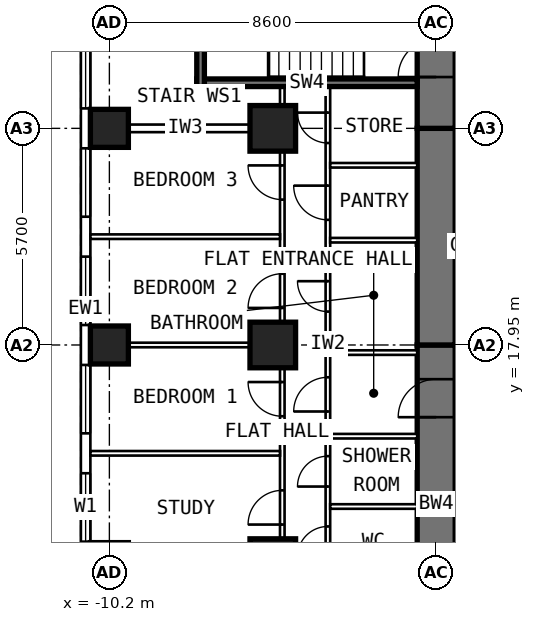
"""IFC4 building model, lengths in metres.
Left out: names, types, materials, properties, quantities, classifications, styles, units other than length and angle.
Written with IfcOpenShell. Run it as: python <this file> out.ifc"""

import sys

from ifc_helpers import new_model, si_unit, direction, frame, frame_2d, origin, origin_2d, place, context, subcontext, project, spatial, rectangle, extrude, element, fill, save


model = new_model("IFC4")
c1 = context("Model", 3, precision=1e-05, world=origin(), true_north=direction((0.0, 1.0)))
c2 = subcontext(c1, "Body", "Model", "MODEL_VIEW")
j1 = project(units=[si_unit("LENGTHUNIT", "METRE"), si_unit("PLANEANGLEUNIT", "RADIAN")], contexts=[c1])
p1 = place(None, origin())
s1 = spatial("IfcSite", under=j1, at=p1, CompositionType="ELEMENT")
p2 = place(p1, origin())
s2 = spatial("IfcBuilding", under=s1, at=p2, CompositionType="ELEMENT")
p3 = place(p2, frame((0.0, 0.0, 71.8)))
s3 = spatial("IfcBuildingStorey", under=s2, at=p3, CompositionType="ELEMENT", Elevation=71.8)
for number, where, z_axis, x_axis in (
    (1, (-10.2, 17.95, 0.0), (0.0, 0.0, 1.0), (0.0, 1.0, 0.0)),
    (2, (-10.2, 23.65, 0.0), (0.0, 0.0, 1.0), (0.0, 1.0, 0.0)),
):
    element("IfcColumn", number, at=place(p3, frame(where, z_axis=z_axis, x_axis=x_axis)), inside=s3, PredefinedType="COLUMN", context=c2, shape_type="SweptSolid", body=[
        extrude(rectangle(XDim=1.0, YDim=1.0, at=origin_2d()), origin(), (0.0, 0.0, 1.0), 3.6),
    ])
for number, where, z_axis, x_axis in (
    (3, (-5.9, 12.25, 0.0), (0.0, 0.0, 1.0), (0.0, 1.0, 0.0)),
    (4, (-5.9, 17.95, 0.0), (0.0, 0.0, 1.0), (0.0, 1.0, 0.0)),
    (5, (-5.9, 23.65, 0.0), (0.0, 0.0, 1.0), (0.0, 1.0, 0.0)),
):
    element("IfcColumn", number, at=place(p3, frame(where, z_axis=z_axis, x_axis=x_axis)), inside=s3, PredefinedType="COLUMN", context=c2, shape_type="SweptSolid", body=[
        extrude(rectangle(XDim=1.2, YDim=1.2, at=origin_2d()), origin(), (0.0, 0.0, 1.0), 3.6),
    ])
p4 = place(p3, frame((-1.6, 9.6, 0.0), z_axis=(0.0, 0.0, 1.0), x_axis=(0.0, 1.0, 0.0)))
e6 = element("IfcWall", 6, at=p4, inside=s3, PredefinedType="SHEAR", context=c2, shape_type="SweptSolid", body=[
    extrude(rectangle(XDim=8.35, YDim=1.0, at=frame_2d((4.175, 0.0))), origin(), (0.0, 0.0, 1.0), 3.6),
])
p5 = place(p4, frame((6.45, 0.0, 0.0)))
e7 = element("IfcOpeningElement", 7, at=p5, cuts=e6, PredefinedType="OPENING", context=c2, shape_type="SweptSolid", body=[
    extrude(rectangle(XDim=1.0, YDim=2.1, at=frame_2d((0.5, 1.05))), frame((0.0, 0.512, 0.0), z_axis=(0.0, -1.0, 0.0), x_axis=(1.0, 0.0, 0.0)), (0.0, 0.0, 1.0), 1.024),
])
p6 = place(p3, frame((-1.6, 17.95, 0.0), z_axis=(0.0, 0.0, 1.0), x_axis=(0.0, 1.0, 0.0)))
e8 = element("IfcWall", 8, at=p6, inside=s3, PredefinedType="SHEAR", context=c2, shape_type="SweptSolid", body=[
    extrude(rectangle(XDim=5.7, YDim=1.0, at=frame_2d((2.85, 0.0))), origin(), (0.0, 0.0, 1.0), 3.6),
])
p7 = place(p3, frame((-1.6, 23.65, 0.0), z_axis=(0.0, 0.0, 1.0), x_axis=(0.0, 1.0, 0.0)))
e9 = element("IfcWall", 9, at=p7, inside=s3, PredefinedType="SHEAR", context=c2, shape_type="SweptSolid", body=[
    extrude(rectangle(XDim=10.745, YDim=1.0, at=frame_2d((5.373, 0.0))), origin(), (0.0, 0.0, 1.0), 3.6),
])
p8 = place(p7, frame((6.1, 0.0, 0.0)))
e10 = element("IfcOpeningElement", 10, at=p8, cuts=e9, PredefinedType="OPENING", context=c2, shape_type="SweptSolid", body=[
    extrude(rectangle(XDim=1.0, YDim=2.1, at=frame_2d((0.5, 1.05))), frame((0.0, 0.512, 0.0), z_axis=(0.0, -1.0, 0.0), x_axis=(1.0, 0.0, 0.0)), (0.0, 0.0, 1.0), 1.024),
])
p9 = place(p7, frame((1.35, 0.0, 0.0)))
e11 = element("IfcOpeningElement", 11, at=p9, cuts=e9, PredefinedType="OPENING", context=c2, shape_type="SweptSolid", body=[
    extrude(rectangle(XDim=1.0, YDim=2.1, at=frame_2d((0.5, 1.05))), frame((0.0, 0.512, 0.0), z_axis=(0.0, -1.0, 0.0), x_axis=(1.0, 0.0, 0.0)), (0.0, 0.0, 1.0), 1.024),
])
p10 = place(p3, frame((-10.825, 6.148, 0.0), z_axis=(0.0, 0.0, 1.0), x_axis=(0.0, 1.0, 0.0)))
e12 = element("IfcWall", 12, at=p10, inside=s3, PredefinedType="SOLIDWALL", context=c2, shape_type="SweptSolid", body=[
    extrude(rectangle(XDim=25.487, YDim=0.25, at=frame_2d((12.744, 0.0))), origin(), (0.0, 0.0, 1.0), 3.35),
])
p11 = place(p10, frame((0.927, 0.0, 0.8)))
e13 = element("IfcOpeningElement", 13, at=p11, cuts=e12, PredefinedType="OPENING", context=c2, shape_type="SweptSolid", body=[
    extrude(rectangle(XDim=1.8, YDim=1.8, at=frame_2d((0.9, 0.9))), frame((0.0, 0.137, 0.0), z_axis=(0.0, -1.0, 0.0), x_axis=(1.0, 0.0, 0.0)), (0.0, 0.0, 1.0), 0.274),
])
p12 = place(p10, frame((3.777, 0.0, 0.8)))
e14 = element("IfcOpeningElement", 14, at=p12, cuts=e12, PredefinedType="OPENING", context=c2, shape_type="SweptSolid", body=[
    extrude(rectangle(XDim=1.8, YDim=1.8, at=frame_2d((0.9, 0.9))), frame((0.0, 0.137, 0.0), z_axis=(0.0, -1.0, 0.0), x_axis=(1.0, 0.0, 0.0)), (0.0, 0.0, 1.0), 0.274),
])
p13 = place(p10, frame((6.627, 0.0, 0.8)))
e15 = element("IfcOpeningElement", 15, at=p13, cuts=e12, PredefinedType="OPENING", context=c2, shape_type="SweptSolid", body=[
    extrude(rectangle(XDim=1.8, YDim=1.8, at=frame_2d((0.9, 0.9))), frame((0.0, 0.137, 0.0), z_axis=(0.0, -1.0, 0.0), x_axis=(1.0, 0.0, 0.0)), (0.0, 0.0, 1.0), 0.274),
])
p14 = place(p10, frame((9.477, 0.0, 0.8)))
e16 = element("IfcOpeningElement", 16, at=p14, cuts=e12, PredefinedType="OPENING", context=c2, shape_type="SweptSolid", body=[
    extrude(rectangle(XDim=1.8, YDim=1.8, at=frame_2d((0.9, 0.9))), frame((0.0, 0.137, 0.0), z_axis=(0.0, -1.0, 0.0), x_axis=(1.0, 0.0, 0.0)), (0.0, 0.0, 1.0), 0.274),
])
p15 = place(p10, frame((12.327, 0.0, 0.8)))
e17 = element("IfcOpeningElement", 17, at=p15, cuts=e12, PredefinedType="OPENING", context=c2, shape_type="SweptSolid", body=[
    extrude(rectangle(XDim=1.8, YDim=1.8, at=frame_2d((0.9, 0.9))), frame((0.0, 0.137, 0.0), z_axis=(0.0, -1.0, 0.0), x_axis=(1.0, 0.0, 0.0)), (0.0, 0.0, 1.0), 0.274),
])
p16 = place(p10, frame((15.177, 0.0, 0.8)))
e18 = element("IfcOpeningElement", 18, at=p16, cuts=e12, PredefinedType="OPENING", context=c2, shape_type="SweptSolid", body=[
    extrude(rectangle(XDim=1.8, YDim=1.8, at=frame_2d((0.9, 0.9))), frame((0.0, 0.137, 0.0), z_axis=(0.0, -1.0, 0.0), x_axis=(1.0, 0.0, 0.0)), (0.0, 0.0, 1.0), 0.274),
])
p17 = place(p10, frame((18.027, 0.0, 0.8)))
e19 = element("IfcOpeningElement", 19, at=p17, cuts=e12, PredefinedType="OPENING", context=c2, shape_type="SweptSolid", body=[
    extrude(rectangle(XDim=1.8, YDim=1.8, at=frame_2d((0.9, 0.9))), frame((0.0, 0.137, 0.0), z_axis=(0.0, -1.0, 0.0), x_axis=(1.0, 0.0, 0.0)), (0.0, 0.0, 1.0), 0.274),
])
p18 = place(p10, frame((20.877, 0.0, 0.8)))
e20 = element("IfcOpeningElement", 20, at=p18, cuts=e12, PredefinedType="OPENING", context=c2, shape_type="SweptSolid", body=[
    extrude(rectangle(XDim=1.8, YDim=1.8, at=frame_2d((0.9, 0.9))), frame((0.0, 0.137, 0.0), z_axis=(0.0, -1.0, 0.0), x_axis=(1.0, 0.0, 0.0)), (0.0, 0.0, 1.0), 0.274),
])
p19 = place(p3, frame((-4.45, 10.1, 0.0), z_axis=(0.0, 0.0, 1.0), x_axis=(0.0, 1.0, 0.0)))
e21 = element("IfcWall", 21, at=p19, inside=s3, PredefinedType="PARTITIONING", context=c2, shape_type="SweptSolid", body=[
    extrude(rectangle(XDim=14.65, YDim=0.12, at=frame_2d((7.325, 0.0))), origin(), (0.0, 0.0, 1.0), 3.35),
])
p20 = place(p19, frame((0.375, 0.0, 0.0)))
e22 = element("IfcOpeningElement", 22, at=p20, cuts=e21, PredefinedType="OPENING", context=c2, shape_type="SweptSolid", body=[
    extrude(rectangle(XDim=0.9, YDim=2.1, at=frame_2d((0.45, 1.05))), frame((0.0, 0.072, 0.0), z_axis=(0.0, -1.0, 0.0), x_axis=(1.0, 0.0, 0.0)), (0.0, 0.0, 1.0), 0.144),
])
p21 = place(p19, frame((2.275, 0.0, 0.0)))
e23 = element("IfcOpeningElement", 23, at=p21, cuts=e21, PredefinedType="OPENING", context=c2, shape_type="SweptSolid", body=[
    extrude(rectangle(XDim=0.8, YDim=2.1, at=frame_2d((0.4, 1.05))), frame((0.0, 0.072, 0.0), z_axis=(0.0, -1.0, 0.0), x_axis=(1.0, 0.0, 0.0)), (0.0, 0.0, 1.0), 0.144),
])
p22 = place(p19, frame((4.125, 0.0, 0.0)))
e24 = element("IfcOpeningElement", 24, at=p22, cuts=e21, PredefinedType="OPENING", context=c2, shape_type="SweptSolid", body=[
    extrude(rectangle(XDim=0.8, YDim=2.1, at=frame_2d((0.4, 1.05))), frame((0.0, 0.072, 0.0), z_axis=(0.0, -1.0, 0.0), x_axis=(1.0, 0.0, 0.0)), (0.0, 0.0, 1.0), 0.144),
])
p23 = place(p19, frame((6.1, 0.0, 0.0)))
e25 = element("IfcOpeningElement", 25, at=p23, cuts=e21, PredefinedType="OPENING", context=c2, shape_type="SweptSolid", body=[
    extrude(rectangle(XDim=0.9, YDim=2.1, at=frame_2d((0.45, 1.05))), frame((0.0, 0.072, 0.0), z_axis=(0.0, -1.0, 0.0), x_axis=(1.0, 0.0, 0.0)), (0.0, 0.0, 1.0), 0.144),
])
p24 = place(p19, frame((8.729, 0.0, 0.0)))
e26 = element("IfcOpeningElement", 26, at=p24, cuts=e21, PredefinedType="OPENING", context=c2, shape_type="SweptSolid", body=[
    extrude(rectangle(XDim=0.8, YDim=2.1, at=frame_2d((0.4, 1.05))), frame((0.0, 0.072, 0.0), z_axis=(0.0, -1.0, 0.0), x_axis=(1.0, 0.0, 0.0)), (0.0, 0.0, 1.0), 0.144),
])
p25 = place(p19, frame((11.143, 0.0, 0.0)))
e27 = element("IfcOpeningElement", 27, at=p25, cuts=e21, PredefinedType="OPENING", context=c2, shape_type="SweptSolid", body=[
    extrude(rectangle(XDim=0.9, YDim=2.1, at=frame_2d((0.45, 1.05))), frame((0.0, 0.072, 0.0), z_axis=(0.0, -1.0, 0.0), x_axis=(1.0, 0.0, 0.0)), (0.0, 0.0, 1.0), 0.144),
])
p26 = place(p19, frame((13.164, 0.0, 0.0)))
e28 = element("IfcOpeningElement", 28, at=p26, cuts=e21, PredefinedType="OPENING", context=c2, shape_type="SweptSolid", body=[
    extrude(rectangle(XDim=0.8, YDim=2.1, at=frame_2d((0.4, 1.05))), frame((0.0, 0.072, 0.0), z_axis=(0.0, -1.0, 0.0), x_axis=(1.0, 0.0, 0.0)), (0.0, 0.0, 1.0), 0.144),
])
p27 = place(p3, frame((-5.65, 9.6, 0.0), z_axis=(0.0, 0.0, 1.0), x_axis=(0.0, 1.0, 0.0)))
e29 = element("IfcWall", 29, at=p27, inside=s3, PredefinedType="PARTITIONING", context=c2, shape_type="SweptSolid", body=[
    extrude(rectangle(XDim=15.15, YDim=0.12, at=frame_2d((7.575, 0.0))), origin(), (0.0, 0.0, 1.0), 3.35),
])
p28 = place(p27, frame((1.0, 0.0, 0.0)))
e30 = element("IfcOpeningElement", 30, at=p28, cuts=e29, PredefinedType="OPENING", context=c2, shape_type="SweptSolid", body=[
    extrude(rectangle(XDim=0.9, YDim=2.1, at=frame_2d((0.45, 1.05))), frame((0.0, 0.072, 0.0), z_axis=(0.0, -1.0, 0.0), x_axis=(1.0, 0.0, 0.0)), (0.0, 0.0, 1.0), 0.144),
])
p29 = place(p27, frame((3.625, 0.0, 0.0)))
e31 = element("IfcOpeningElement", 31, at=p29, cuts=e29, PredefinedType="OPENING", context=c2, shape_type="SweptSolid", body=[
    extrude(rectangle(XDim=0.9, YDim=2.1, at=frame_2d((0.45, 1.05))), frame((0.0, 0.072, 0.0), z_axis=(0.0, -1.0, 0.0), x_axis=(1.0, 0.0, 0.0)), (0.0, 0.0, 1.0), 0.144),
])
p30 = place(p27, frame((6.475, 0.0, 0.0)))
e32 = element("IfcOpeningElement", 32, at=p30, cuts=e29, PredefinedType="OPENING", context=c2, shape_type="SweptSolid", body=[
    extrude(rectangle(XDim=0.9, YDim=2.1, at=frame_2d((0.45, 1.05))), frame((0.0, 0.072, 0.0), z_axis=(0.0, -1.0, 0.0), x_axis=(1.0, 0.0, 0.0)), (0.0, 0.0, 1.0), 0.144),
])
p31 = place(p27, frame((9.325, 0.0, 0.0)))
e33 = element("IfcOpeningElement", 33, at=p31, cuts=e29, PredefinedType="OPENING", context=c2, shape_type="SweptSolid", body=[
    extrude(rectangle(XDim=0.9, YDim=2.1, at=frame_2d((0.45, 1.05))), frame((0.0, 0.072, 0.0), z_axis=(0.0, -1.0, 0.0), x_axis=(1.0, 0.0, 0.0)), (0.0, 0.0, 1.0), 0.144),
])
p32 = place(p27, frame((12.175, 0.0, 0.0)))
e34 = element("IfcOpeningElement", 34, at=p32, cuts=e29, PredefinedType="OPENING", context=c2, shape_type="SweptSolid", body=[
    extrude(rectangle(XDim=0.9, YDim=2.1, at=frame_2d((0.45, 1.05))), frame((0.0, 0.072, 0.0), z_axis=(0.0, -1.0, 0.0), x_axis=(1.0, 0.0, 0.0)), (0.0, 0.0, 1.0), 0.144),
])
p33 = place(p3, frame((-5.71, 15.1, 0.0), z_axis=(0.0, 0.0, 1.0), x_axis=(-1.0, 0.0, 0.0)))
e35 = element("IfcWall", 35, at=p33, inside=s3, PredefinedType="PARTITIONING", context=c2, shape_type="SweptSolid", body=[
    extrude(rectangle(XDim=4.99, YDim=0.12, at=frame_2d((2.495, 0.0))), origin(), (0.0, 0.0, 1.0), 3.35),
])
p34 = place(p3, frame((-5.71, 17.95, 0.0), z_axis=(0.0, 0.0, 1.0), x_axis=(-1.0, 0.0, 0.0)))
e36 = element("IfcWall", 36, at=p34, inside=s3, PredefinedType="PARTITIONING", context=c2, shape_type="SweptSolid", body=[
    extrude(rectangle(XDim=4.99, YDim=0.12, at=frame_2d((2.495, 0.0))), origin(), (0.0, 0.0, 1.0), 2.45),
])
p35 = place(p3, frame((-5.71, 20.8, 0.0), z_axis=(0.0, 0.0, 1.0), x_axis=(-1.0, 0.0, 0.0)))
e37 = element("IfcWall", 37, at=p35, inside=s3, PredefinedType="PARTITIONING", context=c2, shape_type="SweptSolid", body=[
    extrude(rectangle(XDim=4.99, YDim=0.12, at=frame_2d((2.495, 0.0))), origin(), (0.0, 0.0, 1.0), 3.35),
])
for number, where, z_axis, x_axis in (
    (38, (-2.1, 13.7, 0.0), (0.0, 0.0, 1.0), (-1.0, 0.0, 0.0)),
    (39, (-2.1, 15.55, 0.0), (0.0, 0.0, 1.0), (-1.0, 0.0, 0.0)),
):
    element("IfcWall", number, at=place(p3, frame(where, z_axis=z_axis, x_axis=x_axis)), inside=s3, PredefinedType="PARTITIONING", context=c2, shape_type="SweptSolid", body=[
        extrude(rectangle(XDim=2.29, YDim=0.12, at=frame_2d((1.145, 0.0))), origin(), (0.0, 0.0, 1.0), 3.35),
    ])
p36 = place(p3, frame((-2.1, 17.75, 0.0), z_axis=(0.0, 0.0, 1.0), x_axis=(-1.0, 0.0, 0.0)))
e40 = element("IfcWall", 40, at=p36, inside=s3, PredefinedType="PARTITIONING", context=c2, shape_type="SweptSolid", body=[
    extrude(rectangle(XDim=2.29, YDim=0.12, at=frame_2d((1.145, 0.0))), origin(), (0.0, 0.0, 1.0), 2.45),
])
for number, where, z_axis, x_axis in (
    (41, (-2.1, 20.707, 0.0), (0.0, 0.0, 1.0), (-1.0, 0.0, 0.0)),
    (42, (-2.1, 22.678, 0.0), (0.0, 0.0, 1.0), (-1.0, 0.0, 0.0)),
):
    element("IfcWall", number, at=place(p3, frame(where, z_axis=z_axis, x_axis=x_axis)), inside=s3, PredefinedType="PARTITIONING", context=c2, shape_type="SweptSolid", body=[
        extrude(rectangle(XDim=2.29, YDim=0.12, at=frame_2d((1.145, 0.0))), origin(), (0.0, 0.0, 1.0), 3.35),
    ])
p37 = place(p3, frame((-5.71, 23.65, 0.0), z_axis=(0.0, 0.0, 1.0), x_axis=(-1.0, 0.0, 0.0)))
e43 = element("IfcWall", 43, at=p37, inside=s3, PredefinedType="PARTITIONING", context=c2, shape_type="SweptSolid", body=[
    extrude(rectangle(XDim=4.99, YDim=0.2, at=frame_2d((2.495, 0.0))), origin(), (0.0, 0.0, 1.0), 2.45),
])
p38 = place(p3, frame((-2.1, 24.85, 0.0), z_axis=(0.0, 0.0, 1.0), x_axis=(-1.0, 0.0, 0.0)))
e44 = element("IfcWall", 44, at=p38, inside=s3, PredefinedType="SHEAR", context=c2, shape_type="SweptSolid", body=[
    extrude(rectangle(XDim=5.8, YDim=0.2, at=frame_2d((2.9, 0.0))), origin(), (0.0, 0.0, 1.0), 3.33),
])
p39 = place(p3, frame((-7.8, 24.75, 0.0), z_axis=(0.0, 0.0, 1.0), x_axis=(0.0, 1.0, 0.0)))
e45 = element("IfcWall", 45, at=p39, inside=s3, PredefinedType="SHEAR", context=c2, shape_type="SweptSolid", body=[
    extrude(rectangle(XDim=4.0, YDim=0.2, at=frame_2d((2.0, 0.0))), origin(), (0.0, 0.0, 1.0), 3.33),
])
p40 = place(p13, origin())
e46 = element("IfcWindow", 46, at=p40, inside=s3, PartitioningType="SINGLE_PANEL", PredefinedType="WINDOW", context=c2, shape_type="SweptSolid", body=[
    extrude(rectangle(XDim=1.8, YDim=1.8, at=frame_2d((0.9, 0.9))), frame((0.0, 0.03, 0.0), z_axis=(0.0, -1.0, 0.0), x_axis=(1.0, 0.0, 0.0)), (0.0, 0.0, 1.0), 0.06),
])
fill(e15, e46)
p41 = place(p14, origin())
e47 = element("IfcWindow", 47, at=p41, inside=s3, PartitioningType="SINGLE_PANEL", PredefinedType="WINDOW", context=c2, shape_type="SweptSolid", body=[
    extrude(rectangle(XDim=1.8, YDim=1.8, at=frame_2d((0.9, 0.9))), frame((0.0, 0.03, 0.0), z_axis=(0.0, -1.0, 0.0), x_axis=(1.0, 0.0, 0.0)), (0.0, 0.0, 1.0), 0.06),
])
fill(e16, e47)
p42 = place(p15, origin())
e48 = element("IfcWindow", 48, at=p42, inside=s3, PartitioningType="SINGLE_PANEL", PredefinedType="WINDOW", context=c2, shape_type="SweptSolid", body=[
    extrude(rectangle(XDim=1.8, YDim=1.8, at=frame_2d((0.9, 0.9))), frame((0.0, 0.03, 0.0), z_axis=(0.0, -1.0, 0.0), x_axis=(1.0, 0.0, 0.0)), (0.0, 0.0, 1.0), 0.06),
])
fill(e17, e48)
p43 = place(p16, origin())
e49 = element("IfcWindow", 49, at=p43, inside=s3, PartitioningType="SINGLE_PANEL", PredefinedType="WINDOW", context=c2, shape_type="SweptSolid", body=[
    extrude(rectangle(XDim=1.8, YDim=1.8, at=frame_2d((0.9, 0.9))), frame((0.0, 0.03, 0.0), z_axis=(0.0, -1.0, 0.0), x_axis=(1.0, 0.0, 0.0)), (0.0, 0.0, 1.0), 0.06),
])
fill(e18, e49)
p44 = place(p17, origin())
e50 = element("IfcWindow", 50, at=p44, inside=s3, PartitioningType="SINGLE_PANEL", PredefinedType="WINDOW", context=c2, shape_type="SweptSolid", body=[
    extrude(rectangle(XDim=1.8, YDim=1.8, at=frame_2d((0.9, 0.9))), frame((0.0, 0.03, 0.0), z_axis=(0.0, -1.0, 0.0), x_axis=(1.0, 0.0, 0.0)), (0.0, 0.0, 1.0), 0.06),
])
fill(e19, e50)
p45 = place(p5, origin())
e51 = element("IfcDoor", 51, at=p45, inside=s3, OperationType="SINGLE_SWING_LEFT", PredefinedType="DOOR", context=c2, shape_type="SweptSolid", body=[
    extrude(rectangle(XDim=1.0, YDim=2.1, at=frame_2d((0.5, 1.05))), frame((0.0, 0.25, 0.0), z_axis=(0.0, -1.0, 0.0), x_axis=(1.0, 0.0, 0.0)), (0.0, 0.0, 1.0), 0.5),
])
fill(e7, e51)
p46 = place(p29, origin())
e52 = element("IfcDoor", 52, at=p46, inside=s3, OperationType="SINGLE_SWING_LEFT", PredefinedType="DOOR", context=c2, shape_type="SweptSolid", body=[
    extrude(rectangle(XDim=0.9, YDim=2.1, at=frame_2d((0.45, 1.05))), frame((0.0, 0.025, 0.0), z_axis=(0.0, -1.0, 0.0), x_axis=(1.0, 0.0, 0.0)), (0.0, 0.0, 1.0), 0.05),
])
fill(e31, e52)
p47 = place(p30, origin())
e53 = element("IfcDoor", 53, at=p47, inside=s3, OperationType="SINGLE_SWING_RIGHT", PredefinedType="DOOR", context=c2, shape_type="SweptSolid", body=[
    extrude(rectangle(XDim=0.9, YDim=2.1, at=frame_2d((0.45, 1.05))), frame((0.0, 0.025, 0.0), z_axis=(0.0, -1.0, 0.0), x_axis=(1.0, 0.0, 0.0)), (0.0, 0.0, 1.0), 0.05),
])
fill(e32, e53)
p48 = place(p31, origin())
e54 = element("IfcDoor", 54, at=p48, inside=s3, OperationType="SINGLE_SWING_LEFT", PredefinedType="DOOR", context=c2, shape_type="SweptSolid", body=[
    extrude(rectangle(XDim=0.9, YDim=2.1, at=frame_2d((0.45, 1.05))), frame((0.0, 0.025, 0.0), z_axis=(0.0, -1.0, 0.0), x_axis=(1.0, 0.0, 0.0)), (0.0, 0.0, 1.0), 0.05),
])
fill(e33, e54)
p49 = place(p32, origin())
e55 = element("IfcDoor", 55, at=p49, inside=s3, OperationType="SINGLE_SWING_RIGHT", PredefinedType="DOOR", context=c2, shape_type="SweptSolid", body=[
    extrude(rectangle(XDim=0.9, YDim=2.1, at=frame_2d((0.45, 1.05))), frame((0.0, 0.025, 0.0), z_axis=(0.0, -1.0, 0.0), x_axis=(1.0, 0.0, 0.0)), (0.0, 0.0, 1.0), 0.05),
])
fill(e34, e55)
p50 = place(p21, origin())
e56 = element("IfcDoor", 56, at=p50, inside=s3, OperationType="SINGLE_SWING_LEFT", PredefinedType="DOOR", context=c2, shape_type="SweptSolid", body=[
    extrude(rectangle(XDim=0.8, YDim=2.1, at=frame_2d((0.4, 1.05))), frame((0.0, 0.025, 0.0), z_axis=(0.0, -1.0, 0.0), x_axis=(1.0, 0.0, 0.0)), (0.0, 0.0, 1.0), 0.05),
])
fill(e23, e56)
p51 = place(p22, origin())
e57 = element("IfcDoor", 57, at=p51, inside=s3, OperationType="SINGLE_SWING_LEFT", PredefinedType="DOOR", context=c2, shape_type="SweptSolid", body=[
    extrude(rectangle(XDim=0.8, YDim=2.1, at=frame_2d((0.4, 1.05))), frame((0.0, 0.025, 0.0), z_axis=(0.0, -1.0, 0.0), x_axis=(1.0, 0.0, 0.0)), (0.0, 0.0, 1.0), 0.05),
])
fill(e24, e57)
p52 = place(p23, origin())
e58 = element("IfcDoor", 58, at=p52, inside=s3, OperationType="SINGLE_SWING_LEFT", PredefinedType="DOOR", context=c2, shape_type="SweptSolid", body=[
    extrude(rectangle(XDim=0.9, YDim=2.1, at=frame_2d((0.45, 1.05))), frame((0.0, 0.025, 0.0), z_axis=(0.0, -1.0, 0.0), x_axis=(1.0, 0.0, 0.0)), (0.0, 0.0, 1.0), 0.05),
])
fill(e25, e58)
p53 = place(p24, origin())
e59 = element("IfcDoor", 59, at=p53, inside=s3, OperationType="SINGLE_SWING_RIGHT", PredefinedType="DOOR", context=c2, shape_type="SweptSolid", body=[
    extrude(rectangle(XDim=0.8, YDim=2.1, at=frame_2d((0.4, 1.05))), frame((0.0, 0.025, 0.0), z_axis=(0.0, -1.0, 0.0), x_axis=(1.0, 0.0, 0.0)), (0.0, 0.0, 1.0), 0.05),
])
fill(e26, e59)
p54 = place(p25, origin())
e60 = element("IfcDoor", 60, at=p54, inside=s3, OperationType="SINGLE_SWING_RIGHT", PredefinedType="DOOR", context=c2, shape_type="SweptSolid", body=[
    extrude(rectangle(XDim=0.9, YDim=2.1, at=frame_2d((0.45, 1.05))), frame((0.0, 0.025, 0.0), z_axis=(0.0, -1.0, 0.0), x_axis=(1.0, 0.0, 0.0)), (0.0, 0.0, 1.0), 0.05),
])
fill(e27, e60)
p55 = place(p26, origin())
e61 = element("IfcDoor", 61, at=p55, inside=s3, OperationType="SINGLE_SWING_RIGHT", PredefinedType="DOOR", context=c2, shape_type="SweptSolid", body=[
    extrude(rectangle(XDim=0.8, YDim=2.1, at=frame_2d((0.4, 1.05))), frame((0.0, 0.025, 0.0), z_axis=(0.0, -1.0, 0.0), x_axis=(1.0, 0.0, 0.0)), (0.0, 0.0, 1.0), 0.05),
])
fill(e28, e61)
p56 = place(p9, origin())
e62 = element("IfcDoor", 62, at=p56, inside=s3, OperationType="SINGLE_SWING_LEFT", PredefinedType="DOOR", context=c2, shape_type="SweptSolid", body=[
    extrude(rectangle(XDim=1.0, YDim=2.1, at=frame_2d((0.5, 1.05))), frame((0.0, 0.25, 0.0), z_axis=(0.0, -1.0, 0.0), x_axis=(1.0, 0.0, 0.0)), (0.0, 0.0, 1.0), 0.5),
])
fill(e11, e62)
save(model, sys.argv[1])
